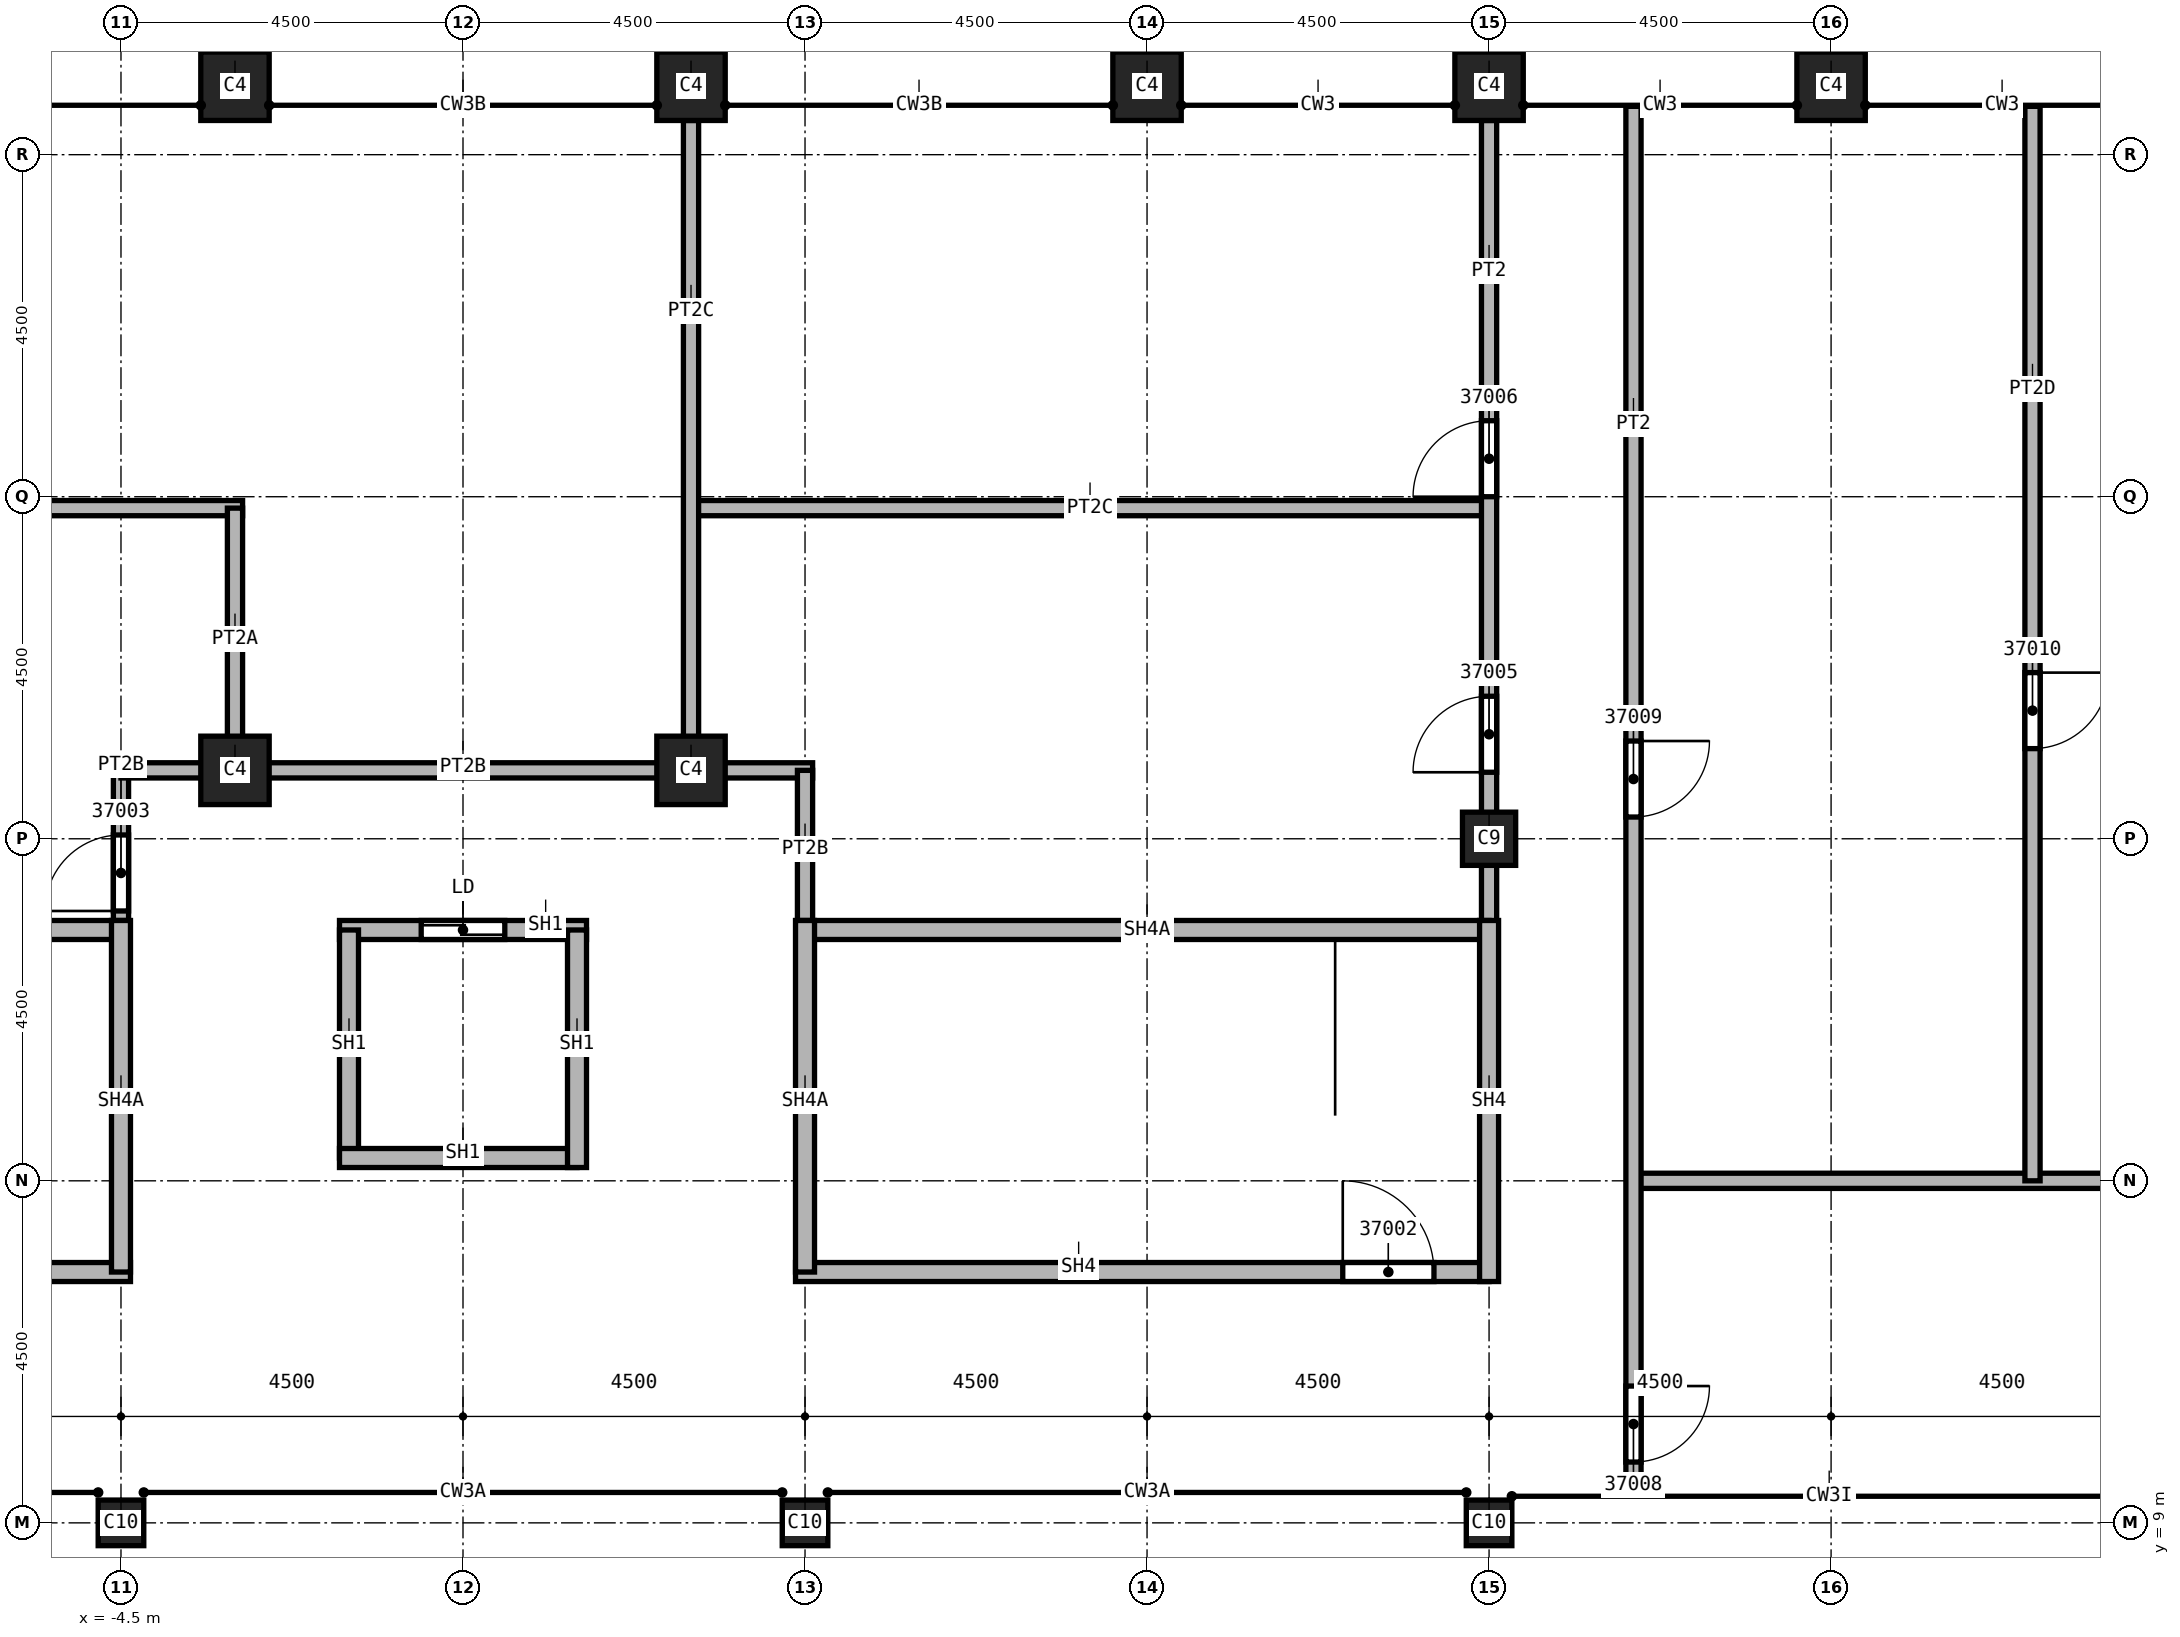
"""IFC4 building model, lengths in metres.
Left out: names, types, materials, properties, quantities, classifications, styles, units other than length and angle.
Written with IfcOpenShell. Run it as: python <this file> out.ifc"""

import sys

from ifc_helpers import new_model, si_unit, direction, frame, frame_2d, origin, origin_2d, place, context, subcontext, project, spatial, rectangle, extrude, element, fill, save


model = new_model("IFC4")
c1 = context("Model", 3, precision=1e-05, world=origin(), true_north=direction((0.0, 1.0)))
c2 = subcontext(c1, "Body", "Model", "MODEL_VIEW")
j1 = project(units=[si_unit("LENGTHUNIT", "METRE"), si_unit("PLANEANGLEUNIT", "RADIAN")], contexts=[c1])
p1 = place(None, origin())
s1 = spatial("IfcSite", under=j1, at=p1, CompositionType="ELEMENT")
p2 = place(p1, origin())
s2 = spatial("IfcBuilding", under=s1, at=p2, CompositionType="ELEMENT")
p3 = place(p2, frame((0.0, 0.0, 386.0)))
s3 = spatial("IfcBuildingStorey", under=s2, at=p3, CompositionType="ELEMENT", Elevation=386.0)
p4 = place(p3, frame((13.5, 18.0, 0.0), z_axis=(0.0, 0.0, 1.0), x_axis=(1.0, 0.0, 0.0)))
e1 = element("IfcColumn", 1, at=p4, inside=s3, PredefinedType="COLUMN", context=c2, shape_type="SweptSolid", body=[
    extrude(rectangle(XDim=0.7, YDim=0.7, at=origin_2d()), origin(), (0.0, 0.0, 1.0), 5.0),
])
for number, where, z_axis, x_axis in (
    (2, (4.5, 9.0, 0.0), (0.0, 0.0, 1.0), (1.0, 0.0, 0.0)),
    (3, (13.5, 9.0, 0.0), (0.0, 0.0, 1.0), (1.0, 0.0, 0.0)),
    (4, (-4.5, 9.0, 0.0), (0.0, 0.0, 1.0), (1.0, 0.0, 0.0)),
):
    element("IfcColumn", number, at=place(p3, frame(where, z_axis=z_axis, x_axis=x_axis)), inside=s3, PredefinedType="COLUMN", context=c2, shape_type="SweptSolid", body=[
        extrude(rectangle(XDim=0.6, YDim=0.6, at=origin_2d()), origin(), (0.0, 0.0, 1.0), 2.113),
    ])
for number, where, z_axis, x_axis in (
    (5, (3.0, 27.9, 0.0), (0.0, 0.0, 1.0), (1.0, 0.0, 0.0)),
    (6, (9.0, 27.9, 0.0), (0.0, 0.0, 1.0), (1.0, 0.0, 0.0)),
    (7, (13.5, 27.9, 0.0), (0.0, 0.0, 1.0), (1.0, 0.0, 0.0)),
    (8, (18.0, 27.9, 0.0), (0.0, 0.0, 1.0), (1.0, 0.0, 0.0)),
    (9, (-3.0, 27.9, 0.0), (0.0, 0.0, 1.0), (1.0, 0.0, 0.0)),
    (10, (3.0, 18.9, 0.0), (0.0, 0.0, 1.0), (1.0, 0.0, 0.0)),
    (11, (-3.0, 18.9, 0.0), (0.0, 0.0, 1.0), (1.0, 0.0, 0.0)),
):
    element("IfcColumn", number, at=place(p3, frame(where, z_axis=z_axis, x_axis=x_axis)), inside=s3, PredefinedType="COLUMN", context=c2, shape_type="SweptSolid", body=[
        extrude(rectangle(XDim=0.9, YDim=0.9, at=origin_2d()), origin(), (0.0, 0.0, 1.0), 5.0),
    ])
p5 = place(p3, frame((-13.5, 22.35, 0.0), z_axis=(0.0, 0.0, 1.0), x_axis=(1.0, 0.0, 0.0)))
e12 = element("IfcWall", 12, at=p5, inside=s3, PredefinedType="PARTITIONING", context=c2, shape_type="SweptSolid", body=[
    extrude(rectangle(XDim=10.6, YDim=0.2, at=frame_2d((5.3, 0.0))), origin(), (0.0, 0.0, 1.0), 5.632),
])
p6 = place(p3, frame((-4.5, 16.8, 0.0), z_axis=(0.0, 0.0, 1.0), x_axis=(0.0, 1.0, 0.0)))
e13 = element("IfcWall", 13, at=p6, inside=s3, PredefinedType="PARTITIONING", context=c2, shape_type="SweptSolid", body=[
    extrude(rectangle(XDim=2.2, YDim=0.2, at=frame_2d((1.1, 0.0))), origin(), (0.0, 0.0, 1.0), 4.281),
])
p7 = place(p6, frame((0.25, 0.0, 0.0)))
e14 = element("IfcOpeningElement", 14, at=p7, cuts=e13, PredefinedType="OPENING", context=c2, shape_type="SweptSolid", body=[
    extrude(rectangle(XDim=1.0, YDim=2.1, at=frame_2d((0.5, 1.05))), frame((0.0, 0.1, 0.0), z_axis=(0.0, -1.0, 0.0), x_axis=(1.0, 0.0, 0.0)), (0.0, 0.0, 1.0), 0.2),
])
p8 = place(p3, frame((-4.5, 18.9, 0.0), z_axis=(0.0, 0.0, 1.0), x_axis=(1.0, 0.0, 0.0)))
e15 = element("IfcWall", 15, at=p8, inside=s3, PredefinedType="PARTITIONING", context=c2, shape_type="SweptSolid", body=[
    extrude(rectangle(XDim=9.1, YDim=0.2, at=frame_2d((4.55, 0.0))), origin(), (0.0, 0.0, 1.0), 4.281),
])
p9 = place(p3, frame((-3.0, 22.35, 0.0), z_axis=(0.0, 0.0, 1.0), x_axis=(0.0, -1.0, 0.0)))
e16 = element("IfcWall", 16, at=p9, inside=s3, PredefinedType="PARTITIONING", context=c2, shape_type="SweptSolid", body=[
    extrude(rectangle(XDim=3.45, YDim=0.2, at=frame_2d((1.725, 0.0))), origin(), (0.0, 0.0, 1.0), 5.632),
])
p10 = place(p3, frame((3.0, 22.35, 0.0), z_axis=(0.0, 0.0, 1.0), x_axis=(1.0, 0.0, 0.0)))
e17 = element("IfcWall", 17, at=p10, inside=s3, PredefinedType="PARTITIONING", context=c2, shape_type="SweptSolid", body=[
    extrude(rectangle(XDim=10.5, YDim=0.2, at=frame_2d((5.25, 0.0))), origin(), (0.0, 0.0, 1.0), 6.378),
])
p11 = place(p3, frame((3.0, 27.45, 0.0), z_axis=(0.0, 0.0, 1.0), x_axis=(0.0, -1.0, 0.0)))
e18 = element("IfcWall", 18, at=p11, inside=s3, PredefinedType="PARTITIONING", context=c2, shape_type="SweptSolid", body=[
    extrude(rectangle(XDim=8.55, YDim=0.2, at=frame_2d((4.275, 0.0))), origin(), (0.0, 0.0, 1.0), 6.378),
])
p12 = place(p3, frame((4.5, 18.9, 0.0), z_axis=(0.0, 0.0, 1.0), x_axis=(0.0, -1.0, 0.0)))
e19 = element("IfcWall", 19, at=p12, inside=s3, PredefinedType="PARTITIONING", context=c2, shape_type="SweptSolid", body=[
    extrude(rectangle(XDim=2.1, YDim=0.2, at=frame_2d((1.05, 0.0))), origin(), (0.0, 0.0, 1.0), 4.281),
])
p13 = place(p3, frame((13.5, 16.675, 0.0), z_axis=(0.0, 0.0, 1.0), x_axis=(0.0, 1.0, 0.0)))
e20 = element("IfcWall", 20, at=p13, inside=s3, PredefinedType="PARTITIONING", context=c2, shape_type="SweptSolid", body=[
    extrude(rectangle(XDim=10.775, YDim=0.2, at=frame_2d((5.387, 0.0))), origin(), (0.0, 0.0, 1.0), 2.953),
])
p14 = place(p13, frame((2.2, 0.0, 0.0)))
e21 = element("IfcOpeningElement", 21, at=p14, cuts=e20, PredefinedType="OPENING", context=c2, shape_type="SweptSolid", body=[
    extrude(rectangle(XDim=1.0, YDim=2.1, at=frame_2d((0.5, 1.05))), frame((0.0, 0.1, 0.0), z_axis=(0.0, -1.0, 0.0), x_axis=(1.0, 0.0, 0.0)), (0.0, 0.0, 1.0), 0.2),
])
p15 = place(p13, frame((5.825, 0.0, 0.0)))
e22 = element("IfcOpeningElement", 22, at=p15, cuts=e20, PredefinedType="OPENING", context=c2, shape_type="SweptSolid", body=[
    extrude(rectangle(XDim=1.0, YDim=2.1, at=frame_2d((0.5, 1.05))), frame((0.0, 0.1, 0.0), z_axis=(0.0, -1.0, 0.0), x_axis=(1.0, 0.0, 0.0)), (0.0, 0.0, 1.0), 0.2),
])
p16 = place(p3, frame((15.4, 13.5, 0.0), z_axis=(0.0, 0.0, 1.0), x_axis=(1.0, 0.0, 0.0)))
e23 = element("IfcWall", 23, at=p16, inside=s3, PredefinedType="PARTITIONING", context=c2, shape_type="SweptSolid", body=[
    extrude(rectangle(XDim=11.15, YDim=0.2, at=frame_2d((5.575, 0.0))), origin(), (0.0, 0.0, 1.0), 2.953),
])
p17 = place(p3, frame((15.4, 27.636, 0.0), z_axis=(0.0, 0.0, 1.0), x_axis=(0.0, -1.0, 0.0)))
e24 = element("IfcWall", 24, at=p17, inside=s3, PredefinedType="PARTITIONING", context=c2, shape_type="SweptSolid", body=[
    extrude(rectangle(XDim=18.186, YDim=0.2, at=frame_2d((9.093, 0.0))), origin(), (0.0, 0.0, 1.0), 2.953),
])
p18 = place(p17, frame((16.836, 0.0, 0.0)))
e25 = element("IfcOpeningElement", 25, at=p18, cuts=e24, PredefinedType="OPENING", context=c2, shape_type="SweptSolid", body=[
    extrude(rectangle(XDim=1.0, YDim=2.1, at=frame_2d((0.5, 1.05))), frame((0.0, 0.1, 0.0), z_axis=(0.0, -1.0, 0.0), x_axis=(1.0, 0.0, 0.0)), (0.0, 0.0, 1.0), 0.2),
])
p19 = place(p17, frame((8.35, 0.0, 0.0)))
e26 = element("IfcOpeningElement", 26, at=p19, cuts=e24, PredefinedType="OPENING", context=c2, shape_type="SweptSolid", body=[
    extrude(rectangle(XDim=1.0, YDim=2.1, at=frame_2d((0.5, 1.05))), frame((0.0, 0.1, 0.0), z_axis=(0.0, -1.0, 0.0), x_axis=(1.0, 0.0, 0.0)), (0.0, 0.0, 1.0), 0.2),
])
p20 = place(p3, frame((20.65, 27.636, 0.0), z_axis=(0.0, 0.0, 1.0), x_axis=(0.0, -1.0, 0.0)))
e27 = element("IfcWall", 27, at=p20, inside=s3, PredefinedType="PARTITIONING", context=c2, shape_type="SweptSolid", body=[
    extrude(rectangle(XDim=14.136, YDim=0.2, at=frame_2d((7.068, 0.0))), origin(), (0.0, 0.0, 1.0), 4.84),
])
p21 = place(p20, frame((7.45, 0.0, 0.0)))
e28 = element("IfcOpeningElement", 28, at=p21, cuts=e27, PredefinedType="OPENING", context=c2, shape_type="SweptSolid", body=[
    extrude(rectangle(XDim=1.0, YDim=2.1, at=frame_2d((0.5, 1.05))), frame((0.0, 0.1, 0.0), z_axis=(0.0, -1.0, 0.0), x_axis=(1.0, 0.0, 0.0)), (0.0, 0.0, 1.0), 0.2),
])
p22 = place(p3, frame((-1.625, 16.8, 0.0), z_axis=(0.0, 0.0, 1.0), x_axis=(1.0, 0.0, 0.0)))
e29 = element("IfcWall", 29, at=p22, inside=s3, PredefinedType="SOLIDWALL", context=c2, shape_type="SweptSolid", body=[
    extrude(rectangle(XDim=3.25, YDim=0.25, at=frame_2d((1.625, 0.0))), origin(), (0.0, 0.0, 1.0), 4.281),
])
p23 = place(p22, frame((1.075, 0.0, 0.0)))
e30 = element("IfcOpeningElement", 30, at=p23, cuts=e29, PredefinedType="OPENING", context=c2, shape_type="SweptSolid", body=[
    extrude(rectangle(XDim=1.1, YDim=2.1, at=frame_2d((0.55, 1.05))), frame((0.0, 0.125, 0.0), z_axis=(0.0, -1.0, 0.0), x_axis=(1.0, 0.0, 0.0)), (0.0, 0.0, 1.0), 0.25),
])
p24 = place(p3, frame((-1.5, 13.8, 0.0), z_axis=(0.0, 0.0, 1.0), x_axis=(0.0, 1.0, 0.0)))
e31 = element("IfcWall", 31, at=p24, inside=s3, PredefinedType="SOLIDWALL", context=c2, shape_type="SweptSolid", body=[
    extrude(rectangle(XDim=3.0, YDim=0.25, at=frame_2d((1.5, 0.0))), origin(), (0.0, 0.0, 1.0), 4.281),
])
for number, where, z_axis, x_axis in (
    (32, (1.5, 13.8, 0.0), (0.0, 0.0, 1.0), (-1.0, 0.0, 0.0)),
    (33, (1.5, 16.8, 0.0), (0.0, 0.0, 1.0), (0.0, -1.0, 0.0)),
):
    element("IfcWall", number, at=place(p3, frame(where, z_axis=z_axis, x_axis=x_axis)), inside=s3, PredefinedType="SOLIDWALL", context=c2, shape_type="SweptSolid", body=[
        extrude(rectangle(XDim=3.125, YDim=0.25, at=frame_2d((1.562, 0.0))), origin(), (0.0, 0.0, 1.0), 4.281),
    ])
p25 = place(p3, frame((-13.5, 12.3, 0.0), z_axis=(0.0, 0.0, 1.0), x_axis=(1.0, 0.0, 0.0)))
e34 = element("IfcWall", 34, at=p25, inside=s3, PredefinedType="SOLIDWALL", context=c2, shape_type="SweptSolid", body=[
    extrude(rectangle(XDim=9.125, YDim=0.25, at=frame_2d((4.562, 0.0))), origin(), (0.0, 0.0, 1.0), 2.953),
])
p26 = place(p25, frame((0.6, 0.0, 0.0)))
e35 = element("IfcOpeningElement", 35, at=p26, cuts=e34, PredefinedType="OPENING", context=c2, shape_type="SweptSolid", body=[
    extrude(rectangle(XDim=1.2, YDim=2.1, at=frame_2d((0.6, 1.05))), frame((0.0, 0.125, 0.0), z_axis=(0.0, -1.0, 0.0), x_axis=(1.0, 0.0, 0.0)), (0.0, 0.0, 1.0), 0.25),
])
p27 = place(p3, frame((-13.5, 16.8, 0.0), z_axis=(0.0, 0.0, 1.0), x_axis=(1.0, 0.0, 0.0)))
e36 = element("IfcWall", 36, at=p27, inside=s3, PredefinedType="SOLIDWALL", context=c2, shape_type="SweptSolid", body=[
    extrude(rectangle(XDim=9.1, YDim=0.25, at=frame_2d((4.55, 0.0))), origin(), (0.0, 0.0, 1.0), 4.281),
])
p28 = place(p3, frame((-4.5, 16.925, 0.0), z_axis=(0.0, 0.0, 1.0), x_axis=(0.0, -1.0, 0.0)))
e37 = element("IfcWall", 37, at=p28, inside=s3, PredefinedType="SOLIDWALL", context=c2, shape_type="SweptSolid", body=[
    extrude(rectangle(XDim=4.625, YDim=0.25, at=frame_2d((2.312, 0.0))), origin(), (0.0, 0.0, 1.0), 4.281),
])
p29 = place(p3, frame((4.375, 12.3, 0.0), z_axis=(0.0, 0.0, 1.0), x_axis=(1.0, 0.0, 0.0)))
e38 = element("IfcWall", 38, at=p29, inside=s3, PredefinedType="SOLIDWALL", context=c2, shape_type="SweptSolid", body=[
    extrude(rectangle(XDim=9.125, YDim=0.25, at=frame_2d((4.562, 0.0))), origin(), (0.0, 0.0, 1.0), 2.953),
])
p30 = place(p29, frame((7.2, 0.0, 0.0)))
e39 = element("IfcOpeningElement", 39, at=p30, cuts=e38, PredefinedType="OPENING", context=c2, shape_type="SweptSolid", body=[
    extrude(rectangle(XDim=1.2, YDim=2.1, at=frame_2d((0.6, 1.05))), frame((0.0, 0.125, 0.0), z_axis=(0.0, -1.0, 0.0), x_axis=(1.0, 0.0, 0.0)), (0.0, 0.0, 1.0), 0.25),
])
p31 = place(p3, frame((4.4, 16.8, 0.0), z_axis=(0.0, 0.0, 1.0), x_axis=(1.0, 0.0, 0.0)))
e40 = element("IfcWall", 40, at=p31, inside=s3, PredefinedType="SOLIDWALL", context=c2, shape_type="SweptSolid", body=[
    extrude(rectangle(XDim=9.1, YDim=0.25, at=frame_2d((4.55, 0.0))), origin(), (0.0, 0.0, 1.0), 4.281),
])
p32 = place(p3, frame((4.5, 12.3, 0.0), z_axis=(0.0, 0.0, 1.0), x_axis=(0.0, 1.0, 0.0)))
e41 = element("IfcWall", 41, at=p32, inside=s3, PredefinedType="SOLIDWALL", context=c2, shape_type="SweptSolid", body=[
    extrude(rectangle(XDim=4.625, YDim=0.25, at=frame_2d((2.312, 0.0))), origin(), (0.0, 0.0, 1.0), 4.281),
])
p33 = place(p3, frame((13.5, 12.175, 0.0), z_axis=(0.0, 0.0, 1.0), x_axis=(0.0, 1.0, 0.0)))
e42 = element("IfcWall", 42, at=p33, inside=s3, PredefinedType="SOLIDWALL", context=c2, shape_type="SweptSolid", body=[
    extrude(rectangle(XDim=4.75, YDim=0.25, at=frame_2d((2.375, 0.0))), origin(), (0.0, 0.0, 1.0), 2.953),
])
p34 = place(p30, origin())
e43 = element("IfcDoor", 43, at=p34, inside=s3, OperationType="SINGLE_SWING_LEFT", PredefinedType="DOOR", context=c2, shape_type="SweptSolid", body=[
    extrude(rectangle(XDim=1.2, YDim=2.1, at=frame_2d((0.6, 1.05))), frame((0.0, 0.025, 0.0), z_axis=(0.0, -1.0, 0.0), x_axis=(1.0, 0.0, 0.0)), (0.0, 0.0, 1.0), 0.05),
])
fill(e39, e43)
p35 = place(p7, origin())
e44 = element("IfcDoor", 44, at=p35, inside=s3, OperationType="SINGLE_SWING_RIGHT", PredefinedType="DOOR", context=c2, shape_type="SweptSolid", body=[
    extrude(rectangle(XDim=1.0, YDim=2.1, at=frame_2d((0.5, 1.05))), frame((0.0, 0.025, 0.0), z_axis=(0.0, -1.0, 0.0), x_axis=(1.0, 0.0, 0.0)), (0.0, 0.0, 1.0), 0.05),
])
fill(e14, e44)
p36 = place(p14, origin())
e45 = element("IfcDoor", 45, at=p36, inside=s3, OperationType="SINGLE_SWING_RIGHT", PredefinedType="DOOR", context=c2, shape_type="SweptSolid", body=[
    extrude(rectangle(XDim=1.0, YDim=2.1, at=frame_2d((0.5, 1.05))), frame((0.0, 0.025, 0.0), z_axis=(0.0, -1.0, 0.0), x_axis=(1.0, 0.0, 0.0)), (0.0, 0.0, 1.0), 0.05),
])
fill(e21, e45)
p37 = place(p15, origin())
e46 = element("IfcDoor", 46, at=p37, inside=s3, OperationType="SINGLE_SWING_LEFT", PredefinedType="DOOR", context=c2, shape_type="SweptSolid", body=[
    extrude(rectangle(XDim=1.0, YDim=2.1, at=frame_2d((0.5, 1.05))), frame((0.0, 0.025, 0.0), z_axis=(0.0, -1.0, 0.0), x_axis=(1.0, 0.0, 0.0)), (0.0, 0.0, 1.0), 0.05),
])
fill(e22, e46)
p38 = place(p18, origin())
e47 = element("IfcDoor", 47, at=p38, inside=s3, OperationType="SINGLE_SWING_LEFT", PredefinedType="DOOR", context=c2, shape_type="SweptSolid", body=[
    extrude(rectangle(XDim=1.0, YDim=2.1, at=frame_2d((0.5, 1.05))), frame((0.0, 0.025, 0.0), z_axis=(0.0, -1.0, 0.0), x_axis=(1.0, 0.0, 0.0)), (0.0, 0.0, 1.0), 0.05),
])
fill(e25, e47)
p39 = place(p19, origin())
e48 = element("IfcDoor", 48, at=p39, inside=s3, OperationType="SINGLE_SWING_RIGHT", PredefinedType="DOOR", context=c2, shape_type="SweptSolid", body=[
    extrude(rectangle(XDim=1.0, YDim=2.1, at=frame_2d((0.5, 1.05))), frame((0.0, 0.025, 0.0), z_axis=(0.0, -1.0, 0.0), x_axis=(1.0, 0.0, 0.0)), (0.0, 0.0, 1.0), 0.05),
])
fill(e26, e48)
p40 = place(p21, origin())
e49 = element("IfcDoor", 49, at=p40, inside=s3, OperationType="SINGLE_SWING_LEFT", PredefinedType="DOOR", context=c2, shape_type="SweptSolid", body=[
    extrude(rectangle(XDim=1.0, YDim=2.1, at=frame_2d((0.5, 1.05))), frame((0.0, 0.025, 0.0), z_axis=(0.0, -1.0, 0.0), x_axis=(1.0, 0.0, 0.0)), (0.0, 0.0, 1.0), 0.05),
])
fill(e28, e49)
p41 = place(p23, origin())
e50 = element("IfcDoor", 50, at=p41, inside=s3, OperationType="SLIDING_TO_LEFT", PredefinedType="DOOR", context=c2, shape_type="SweptSolid", body=[
    extrude(rectangle(XDim=1.1, YDim=2.1, at=frame_2d((0.55, 1.05))), frame((0.0, 0.025, 0.0), z_axis=(0.0, -1.0, 0.0), x_axis=(1.0, 0.0, 0.0)), (0.0, 0.0, 1.0), 0.05),
])
fill(e30, e50)
save(model, sys.argv[1])
